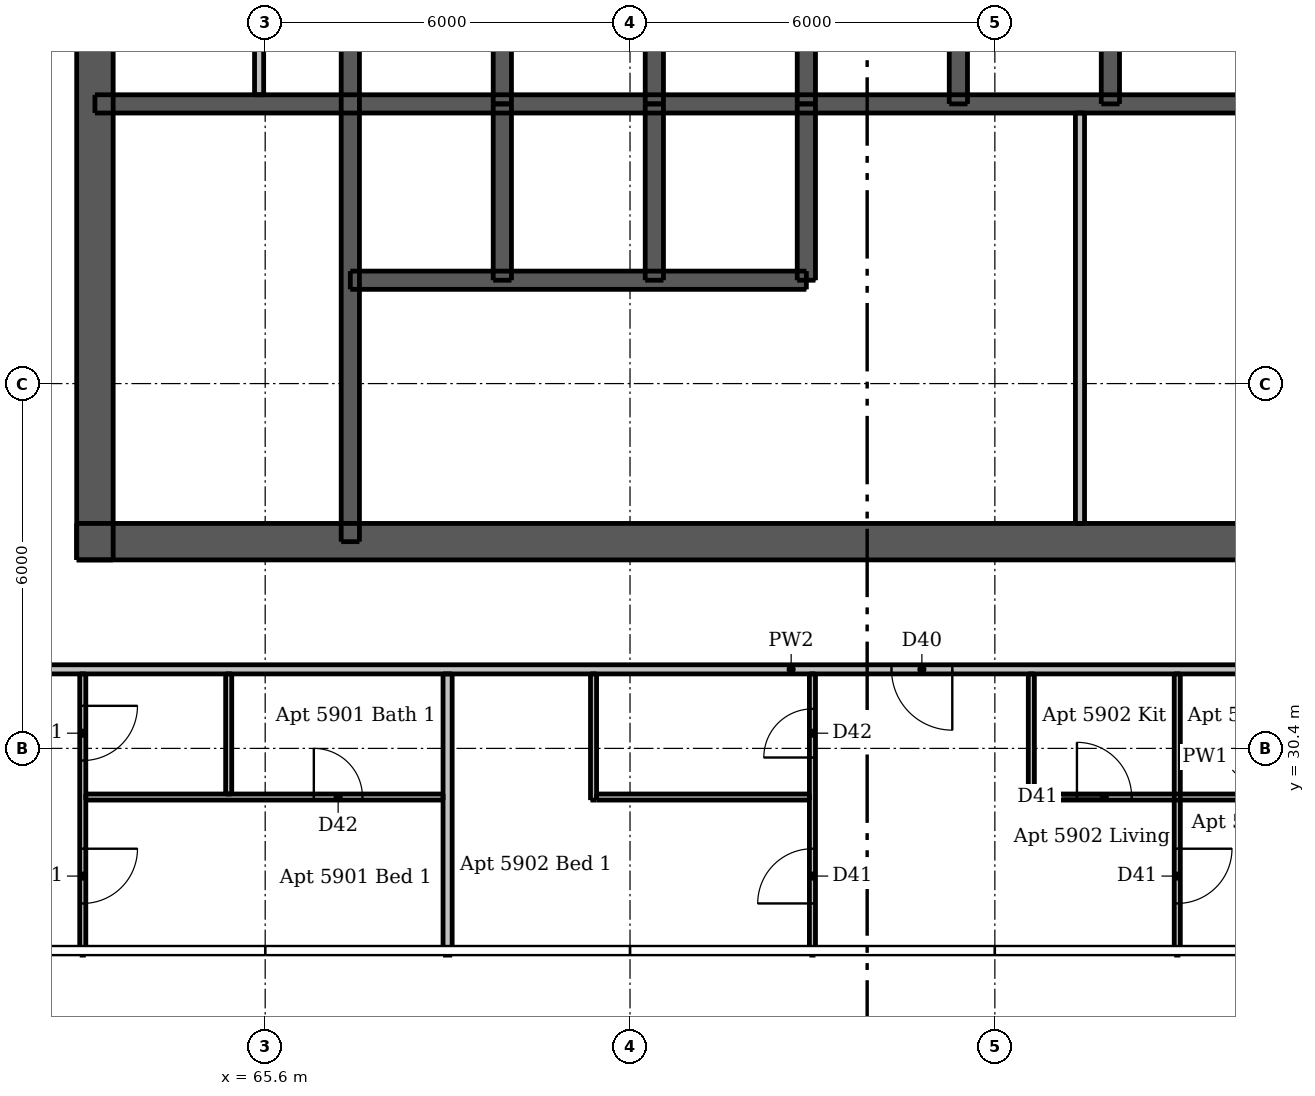
"""IFC4 building model, lengths in metres.
Left out: names, types, materials, properties, quantities, classifications, styles, units other than length and angle.
Written with IfcOpenShell. Run it as: python <this file> out.ifc"""

import sys

from ifc_helpers import new_model, si_unit, direction, frame, frame_2d, origin, place, context, subcontext, project, spatial, rectangle, extrude, element, fill, save


model = new_model("IFC4")
c1 = context("Model", 3, precision=1e-05, world=origin(), true_north=direction((0.0, 1.0)))
c2 = subcontext(c1, "Body", "Model", "MODEL_VIEW")
j1 = project(units=[si_unit("LENGTHUNIT", "METRE"), si_unit("PLANEANGLEUNIT", "RADIAN")], contexts=[c1])
p1 = place(None, origin())
s1 = spatial("IfcSite", under=j1, at=p1, CompositionType="ELEMENT")
p2 = place(p1, origin())
s2 = spatial("IfcBuilding", under=s1, at=p2, CompositionType="ELEMENT")
p3 = place(p2, frame((0.0, 0.0, 220.0)))
s3 = spatial("IfcBuildingStorey", under=s2, at=p3, CompositionType="ELEMENT", Elevation=220.0)
p4 = place(p3, frame((62.5, 33.8, 0.0), z_axis=(0.0, 0.0, 1.0), x_axis=(1.0, 0.0, 0.0)))
e1 = element("IfcWall", 1, at=p4, inside=s3, PredefinedType="SHEAR", context=c2, shape_type="SweptSolid", body=[
    extrude(rectangle(XDim=24.0, YDim=0.6, at=frame_2d((12.0, 0.0))), origin(), (0.0, 0.0, 1.0), 3.05),
])
p5 = place(p4, frame((1.925, 0.0, 0.0)))
e2 = element("IfcOpeningElement", 2, at=p5, cuts=e1, PredefinedType="OPENING", context=c2, shape_type="SweptSolid", body=[
    extrude(rectangle(XDim=1.1, YDim=2.1, at=frame_2d((0.55, 1.05))), frame((0.0, 0.31, 0.0), z_axis=(0.0, -1.0, 0.0), x_axis=(1.0, 0.0, 0.0)), (0.0, 0.0, 1.0), 0.62),
])
p6 = place(p4, frame((20.975, 0.0, 0.0)))
e3 = element("IfcOpeningElement", 3, at=p6, cuts=e1, PredefinedType="OPENING", context=c2, shape_type="SweptSolid", body=[
    extrude(rectangle(XDim=1.1, YDim=2.1, at=frame_2d((0.55, 1.05))), frame((0.0, 0.31, 0.0), z_axis=(0.0, -1.0, 0.0), x_axis=(1.0, 0.0, 0.0)), (0.0, 0.0, 1.0), 0.62),
])
p7 = place(p4, frame((8.0, 0.0, 0.0)))
e4 = element("IfcOpeningElement", 4, at=p7, cuts=e1, PredefinedType="OPENING", context=c2, shape_type="SweptSolid", body=[
    extrude(rectangle(XDim=1.1, YDim=2.1, at=frame_2d((0.55, 1.05))), frame((0.0, 0.31, 0.0), z_axis=(0.0, -1.0, 0.0), x_axis=(1.0, 0.0, 0.0)), (0.0, 0.0, 1.0), 0.62),
])
p8 = place(p4, frame((17.512, 0.0, 0.0)))
e5 = element("IfcOpeningElement", 5, at=p8, cuts=e1, PredefinedType="OPENING", context=c2, shape_type="SweptSolid", body=[
    extrude(rectangle(XDim=0.9, YDim=2.1, at=frame_2d((0.45, 1.05))), frame((0.0, 0.31, 0.0), z_axis=(0.0, -1.0, 0.0), x_axis=(1.0, 0.0, 0.0)), (0.0, 0.0, 1.0), 0.62),
])
p9 = place(p3, frame((62.8, 33.5, 0.0), z_axis=(0.0, 0.0, 1.0), x_axis=(0.0, 1.0, 0.0)))
e6 = element("IfcWall", 6, at=p9, inside=s3, PredefinedType="SHEAR", context=c2, shape_type="SweptSolid", body=[
    extrude(rectangle(XDim=24.0, YDim=0.6, at=frame_2d((12.0, 0.0))), origin(), (0.0, 0.0, 1.0), 3.05),
])
p10 = place(p9, frame((11.2, 0.0, 0.0)))
e7 = element("IfcOpeningElement", 7, at=p10, cuts=e6, PredefinedType="OPENING", context=c2, shape_type="SweptSolid", body=[
    extrude(rectangle(XDim=1.6, YDim=2.1, at=frame_2d((0.8, 1.05))), frame((0.0, 0.31, 0.0), z_axis=(0.0, -1.0, 0.0), x_axis=(1.0, 0.0, 0.0)), (0.0, 0.0, 1.0), 0.62),
])
p11 = place(p3, frame((62.8, 41.0, 0.0), z_axis=(0.0, 0.0, 1.0), x_axis=(1.0, 0.0, 0.0)))
e8 = element("IfcWall", 8, at=p11, inside=s3, PredefinedType="SHEAR", context=c2, shape_type="SweptSolid", body=[
    extrude(rectangle(XDim=23.4, YDim=0.3, at=frame_2d((11.7, 0.0))), origin(), (0.0, 0.0, 1.0), 3.05),
])
p12 = place(p3, frame((67.0, 33.8, 0.0), z_axis=(0.0, 0.0, 1.0), x_axis=(0.0, 1.0, 0.0)))
e9 = element("IfcWall", 9, at=p12, inside=s3, PredefinedType="SHEAR", context=c2, shape_type="SweptSolid", body=[
    extrude(rectangle(XDim=10.1, YDim=0.3, at=frame_2d((5.05, 0.0))), origin(), (0.0, 0.0, 1.0), 3.05),
])
p13 = place(p12, frame((0.5, 0.0, 0.0)))
e10 = element("IfcOpeningElement", 10, at=p13, cuts=e9, PredefinedType="OPENING", context=c2, shape_type="SweptSolid", body=[
    extrude(rectangle(XDim=1.1, YDim=2.1, at=frame_2d((0.55, 1.05))), frame((0.0, 0.16, 0.0), z_axis=(0.0, -1.0, 0.0), x_axis=(1.0, 0.0, 0.0)), (0.0, 0.0, 1.0), 0.32),
])
for number, where, z_axis, x_axis in (
    (11, (69.5, 41.0, 0.0), (0.0, 0.0, 1.0), (0.0, 1.0, 0.0)),
    (12, (72.0, 41.0, 0.0), (0.0, 0.0, 1.0), (0.0, 1.0, 0.0)),
    (13, (74.5, 41.0, 0.0), (0.0, 0.0, 1.0), (0.0, 1.0, 0.0)),
    (14, (77.0, 41.0, 0.0), (0.0, 0.0, 1.0), (0.0, 1.0, 0.0)),
    (15, (79.5, 41.0, 0.0), (0.0, 0.0, 1.0), (0.0, 1.0, 0.0)),
):
    element("IfcWall", number, at=place(p3, frame(where, z_axis=z_axis, x_axis=x_axis)), inside=s3, PredefinedType="SHEAR", context=c2, shape_type="SweptSolid", body=[
        extrude(rectangle(XDim=2.9, YDim=0.3, at=frame_2d((1.45, 0.0))), origin(), (0.0, 0.0, 1.0), 3.05),
    ])
p14 = place(p3, frame((67.0, 38.1, 0.0), z_axis=(0.0, 0.0, 1.0), x_axis=(1.0, 0.0, 0.0)))
e16 = element("IfcWall", 16, at=p14, inside=s3, PredefinedType="SHEAR", context=c2, shape_type="SweptSolid", body=[
    extrude(rectangle(XDim=7.5, YDim=0.3, at=frame_2d((3.75, 0.0))), origin(), (0.0, 0.0, 1.0), 3.05),
])
p15 = place(p14, frame((0.7, 0.0, 0.0)))
e17 = element("IfcOpeningElement", 17, at=p15, cuts=e16, PredefinedType="OPENING", context=c2, shape_type="SweptSolid", body=[
    extrude(rectangle(XDim=1.1, YDim=2.1, at=frame_2d((0.55, 1.05))), frame((0.0, 0.16, 0.0), z_axis=(0.0, -1.0, 0.0), x_axis=(1.0, 0.0, 0.0)), (0.0, 0.0, 1.0), 0.32),
])
p16 = place(p14, frame((3.2, 0.0, 0.0)))
e18 = element("IfcOpeningElement", 18, at=p16, cuts=e16, PredefinedType="OPENING", context=c2, shape_type="SweptSolid", body=[
    extrude(rectangle(XDim=1.1, YDim=2.1, at=frame_2d((0.55, 1.05))), frame((0.0, 0.16, 0.0), z_axis=(0.0, -1.0, 0.0), x_axis=(1.0, 0.0, 0.0)), (0.0, 0.0, 1.0), 0.32),
])
p17 = place(p14, frame((5.65, 0.0, 0.0)))
e19 = element("IfcOpeningElement", 19, at=p17, cuts=e16, PredefinedType="OPENING", context=c2, shape_type="SweptSolid", body=[
    extrude(rectangle(XDim=1.2, YDim=2.1, at=frame_2d((0.6, 1.05))), frame((0.0, 0.16, 0.0), z_axis=(0.0, -1.0, 0.0), x_axis=(1.0, 0.0, 0.0)), (0.0, 0.0, 1.0), 0.32),
])
for number, where, z_axis, x_axis in (
    (20, (69.5, 38.1, 0.0), (0.0, 0.0, 1.0), (0.0, 1.0, 0.0)),
    (21, (72.0, 38.1, 0.0), (0.0, 0.0, 1.0), (0.0, 1.0, 0.0)),
    (22, (74.5, 38.1, 0.0), (0.0, 0.0, 1.0), (0.0, 1.0, 0.0)),
):
    element("IfcWall", number, at=place(p3, frame(where, z_axis=z_axis, x_axis=x_axis)), inside=s3, PredefinedType="SHEAR", context=c2, shape_type="SweptSolid", body=[
        extrude(rectangle(XDim=2.9, YDim=0.3, at=frame_2d((1.45, 0.0))), origin(), (0.0, 0.0, 1.0), 3.05),
    ])
p18 = place(p3, frame((79.0, 34.1, 0.0), z_axis=(0.0, 0.0, 1.0), x_axis=(0.0, 1.0, 0.0)))
e23 = element("IfcWall", 23, at=p18, inside=s3, PredefinedType="PLUMBINGWALL", context=c2, shape_type="SweptSolid", body=[
    extrude(rectangle(XDim=6.75, YDim=0.15, at=frame_2d((3.375, 0.0))), origin(), (0.0, 0.0, 1.0), 3.05),
])
p19 = place(p3, frame((65.5, 41.15, 0.0), z_axis=(0.0, 0.0, 1.0), x_axis=(0.0, 1.0, 0.0)))
e24 = element("IfcWall", 24, at=p19, inside=s3, PredefinedType="PLUMBINGWALL", context=c2, shape_type="SweptSolid", body=[
    extrude(rectangle(XDim=2.6, YDim=0.15, at=frame_2d((1.3, 0.0))), origin(), (0.0, 0.0, 1.0), 3.05),
])
p20 = place(p3, frame((62.6, 31.625, 0.0), z_axis=(0.0, 0.0, 1.0), x_axis=(0.0, -1.0, 0.0)))
e25 = element("IfcWall", 25, at=p20, inside=s3, PredefinedType="PARTITIONING", context=c2, shape_type="SweptSolid", body=[
    extrude(rectangle(XDim=4.625, YDim=0.1, at=frame_2d((2.312, 0.0))), origin(), (0.0, 0.0, 1.0), 3.05),
])
p21 = place(p20, frame((0.525, 0.0, 0.0)))
e26 = element("IfcOpeningElement", 26, at=p21, cuts=e25, PredefinedType="OPENING", context=c2, shape_type="SweptSolid", body=[
    extrude(rectangle(XDim=0.9, YDim=2.1, at=frame_2d((0.45, 1.05))), frame((0.0, 0.06, 0.0), z_axis=(0.0, -1.0, 0.0), x_axis=(1.0, 0.0, 0.0)), (0.0, 0.0, 1.0), 0.12),
])
p22 = place(p20, frame((2.875, 0.0, 0.0)))
e27 = element("IfcOpeningElement", 27, at=p22, cuts=e25, PredefinedType="OPENING", context=c2, shape_type="SweptSolid", body=[
    extrude(rectangle(XDim=0.9, YDim=2.1, at=frame_2d((0.45, 1.05))), frame((0.0, 0.06, 0.0), z_axis=(0.0, -1.0, 0.0), x_axis=(1.0, 0.0, 0.0)), (0.0, 0.0, 1.0), 0.12),
])
p23 = place(p3, frame((65.0, 29.65, 0.0), z_axis=(0.0, 0.0, 1.0), x_axis=(0.0, 1.0, 0.0)))
e28 = element("IfcWall", 28, at=p23, inside=s3, PredefinedType="PARTITIONING", context=c2, shape_type="SweptSolid", body=[
    extrude(rectangle(XDim=1.975, YDim=0.1, at=frame_2d((0.988, 0.0))), origin(), (0.0, 0.0, 1.0), 3.05),
])
p24 = place(p3, frame((71.0, 29.55, 0.0), z_axis=(0.0, 0.0, 1.0), x_axis=(0.0, 1.0, 0.0)))
e29 = element("IfcWall", 29, at=p24, inside=s3, PredefinedType="PARTITIONING", context=c2, shape_type="SweptSolid", body=[
    extrude(rectangle(XDim=2.075, YDim=0.1, at=frame_2d((1.038, 0.0))), origin(), (0.0, 0.0, 1.0), 3.05),
])
p25 = place(p3, frame((74.6, 27.0, 0.0), z_axis=(0.0, 0.0, 1.0), x_axis=(0.0, 1.0, 0.0)))
e30 = element("IfcWall", 30, at=p25, inside=s3, PredefinedType="PARTITIONING", context=c2, shape_type="SweptSolid", body=[
    extrude(rectangle(XDim=4.625, YDim=0.1, at=frame_2d((2.312, 0.0))), origin(), (0.0, 0.0, 1.0), 3.05),
])
p26 = place(p25, frame((0.85, 0.0, 0.0)))
e31 = element("IfcOpeningElement", 31, at=p26, cuts=e30, PredefinedType="OPENING", context=c2, shape_type="SweptSolid", body=[
    extrude(rectangle(XDim=0.9, YDim=2.1, at=frame_2d((0.45, 1.05))), frame((0.0, 0.06, 0.0), z_axis=(0.0, -1.0, 0.0), x_axis=(1.0, 0.0, 0.0)), (0.0, 0.0, 1.0), 0.12),
])
p27 = place(p25, frame((3.25, 0.0, 0.0)))
e32 = element("IfcOpeningElement", 32, at=p27, cuts=e30, PredefinedType="OPENING", context=c2, shape_type="SweptSolid", body=[
    extrude(rectangle(XDim=0.8, YDim=2.1, at=frame_2d((0.4, 1.05))), frame((0.0, 0.06, 0.0), z_axis=(0.0, -1.0, 0.0), x_axis=(1.0, 0.0, 0.0)), (0.0, 0.0, 1.0), 0.12),
])
p28 = place(p3, frame((78.2, 29.55, 0.0), z_axis=(0.0, 0.0, 1.0), x_axis=(0.0, 1.0, 0.0)))
e33 = element("IfcWall", 33, at=p28, inside=s3, PredefinedType="PARTITIONING", context=c2, shape_type="SweptSolid", body=[
    extrude(rectangle(XDim=2.075, YDim=0.1, at=frame_2d((1.038, 0.0))), origin(), (0.0, 0.0, 1.0), 3.05),
])
p29 = place(p3, frame((80.6, 31.625, 0.0), z_axis=(0.0, 0.0, 1.0), x_axis=(0.0, -1.0, 0.0)))
e34 = element("IfcWall", 34, at=p29, inside=s3, PredefinedType="PARTITIONING", context=c2, shape_type="SweptSolid", body=[
    extrude(rectangle(XDim=4.625, YDim=0.1, at=frame_2d((2.312, 0.0))), origin(), (0.0, 0.0, 1.0), 3.05),
])
p30 = place(p29, frame((2.875, 0.0, 0.0)))
e35 = element("IfcOpeningElement", 35, at=p30, cuts=e34, PredefinedType="OPENING", context=c2, shape_type="SweptSolid", body=[
    extrude(rectangle(XDim=0.9, YDim=2.1, at=frame_2d((0.45, 1.05))), frame((0.0, 0.06, 0.0), z_axis=(0.0, -1.0, 0.0), x_axis=(1.0, 0.0, 0.0)), (0.0, 0.0, 1.0), 0.12),
])
p31 = place(p3, frame((62.65, 29.6, 0.0), z_axis=(0.0, 0.0, 1.0), x_axis=(1.0, 0.0, 0.0)))
e36 = element("IfcWall", 36, at=p31, inside=s3, PredefinedType="PARTITIONING", context=c2, shape_type="SweptSolid", body=[
    extrude(rectangle(XDim=5.875, YDim=0.1, at=frame_2d((2.938, 0.0))), origin(), (0.0, 0.0, 1.0), 3.05),
])
p32 = place(p31, frame((3.75, 0.0, 0.0)))
e37 = element("IfcOpeningElement", 37, at=p32, cuts=e36, PredefinedType="OPENING", context=c2, shape_type="SweptSolid", body=[
    extrude(rectangle(XDim=0.8, YDim=2.1, at=frame_2d((0.4, 1.05))), frame((0.0, 0.06, 0.0), z_axis=(0.0, -1.0, 0.0), x_axis=(1.0, 0.0, 0.0)), (0.0, 0.0, 1.0), 0.12),
])
p33 = place(p3, frame((71.05, 29.6, 0.0), z_axis=(0.0, 0.0, 1.0), x_axis=(1.0, 0.0, 0.0)))
e38 = element("IfcWall", 38, at=p33, inside=s3, PredefinedType="PARTITIONING", context=c2, shape_type="SweptSolid", body=[
    extrude(rectangle(XDim=3.5, YDim=0.1, at=frame_2d((1.75, 0.0))), origin(), (0.0, 0.0, 1.0), 3.05),
])
p34 = place(p3, frame((78.25, 29.6, 0.0), z_axis=(0.0, 0.0, 1.0), x_axis=(1.0, 0.0, 0.0)))
e39 = element("IfcWall", 39, at=p34, inside=s3, PredefinedType="PARTITIONING", context=c2, shape_type="SweptSolid", body=[
    extrude(rectangle(XDim=7.4, YDim=0.1, at=frame_2d((3.7, 0.0))), origin(), (0.0, 0.0, 1.0), 3.05),
])
p35 = place(p34, frame((0.7, 0.0, 0.0)))
e40 = element("IfcOpeningElement", 40, at=p35, cuts=e39, PredefinedType="OPENING", context=c2, shape_type="SweptSolid", body=[
    extrude(rectangle(XDim=0.9, YDim=2.1, at=frame_2d((0.45, 1.05))), frame((0.0, 0.06, 0.0), z_axis=(0.0, -1.0, 0.0), x_axis=(1.0, 0.0, 0.0)), (0.0, 0.0, 1.0), 0.12),
])
p36 = place(p34, frame((3.45, 0.0, 0.0)))
e41 = element("IfcOpeningElement", 41, at=p36, cuts=e39, PredefinedType="OPENING", context=c2, shape_type="SweptSolid", body=[
    extrude(rectangle(XDim=0.8, YDim=2.1, at=frame_2d((0.4, 1.05))), frame((0.0, 0.06, 0.0), z_axis=(0.0, -1.0, 0.0), x_axis=(1.0, 0.0, 0.0)), (0.0, 0.0, 1.0), 0.12),
])
p37 = place(p34, frame((5.95, 0.0, 0.0)))
e42 = element("IfcOpeningElement", 42, at=p37, cuts=e39, PredefinedType="OPENING", context=c2, shape_type="SweptSolid", body=[
    extrude(rectangle(XDim=0.9, YDim=2.1, at=frame_2d((0.45, 1.05))), frame((0.0, 0.06, 0.0), z_axis=(0.0, -1.0, 0.0), x_axis=(1.0, 0.0, 0.0)), (0.0, 0.0, 1.0), 0.12),
])
p38 = place(p3, frame((68.6, 27.0, 0.0), z_axis=(0.0, 0.0, 1.0), x_axis=(0.0, 1.0, 0.0)))
e43 = element("IfcWall", 43, at=p38, inside=s3, PredefinedType="PARTITIONING", context=c2, shape_type="SweptSolid", body=[
    extrude(rectangle(XDim=4.625, YDim=0.15, at=frame_2d((2.312, 0.0))), origin(), (0.0, 0.0, 1.0), 3.05),
])
p39 = place(p3, frame((89.525, 31.7, 0.0), z_axis=(0.0, 0.0, 1.0), x_axis=(-1.0, 0.0, 0.0)))
e44 = element("IfcWall", 44, at=p39, inside=s3, PredefinedType="PARTITIONING", context=c2, shape_type="SweptSolid", body=[
    extrude(rectangle(XDim=30.55, YDim=0.15, at=frame_2d((15.275, 0.0))), origin(), (0.0, 0.0, 1.0), 3.05),
])
p40 = place(p39, frame((28.275, 0.0, 0.0)))
e45 = element("IfcOpeningElement", 45, at=p40, cuts=e44, PredefinedType="OPENING", context=c2, shape_type="SweptSolid", body=[
    extrude(rectangle(XDim=1.0, YDim=2.1, at=frame_2d((0.5, 1.05))), frame((0.0, 0.085, 0.0), z_axis=(0.0, -1.0, 0.0), x_axis=(1.0, 0.0, 0.0)), (0.0, 0.0, 1.0), 0.17),
])
p41 = place(p39, frame((12.625, 0.0, 0.0)))
e46 = element("IfcOpeningElement", 46, at=p41, cuts=e44, PredefinedType="OPENING", context=c2, shape_type="SweptSolid", body=[
    extrude(rectangle(XDim=1.0, YDim=2.1, at=frame_2d((0.5, 1.05))), frame((0.0, 0.085, 0.0), z_axis=(0.0, -1.0, 0.0), x_axis=(1.0, 0.0, 0.0)), (0.0, 0.0, 1.0), 0.17),
])
p42 = place(p39, frame((2.425, 0.0, 0.0)))
e47 = element("IfcOpeningElement", 47, at=p42, cuts=e44, PredefinedType="OPENING", context=c2, shape_type="SweptSolid", body=[
    extrude(rectangle(XDim=1.0, YDim=2.1, at=frame_2d((0.5, 1.05))), frame((0.0, 0.085, 0.0), z_axis=(0.0, -1.0, 0.0), x_axis=(1.0, 0.0, 0.0)), (0.0, 0.0, 1.0), 0.17),
])
p43 = place(p5, origin())
e48 = element("IfcDoor", 48, at=p43, inside=s3, OperationType="SINGLE_SWING_LEFT", PredefinedType="DOOR", context=c2, shape_type="SweptSolid", body=[
    extrude(rectangle(XDim=1.1, YDim=2.1, at=frame_2d((0.55, 1.05))), frame((0.0, 0.288, 0.0), z_axis=(0.0, -1.0, 0.0), x_axis=(1.0, 0.0, 0.0)), (0.0, 0.0, 1.0), 0.05),
])
fill(e2, e48)
p44 = place(p7, origin())
e49 = element("IfcDoor", 49, at=p44, inside=s3, OperationType="SINGLE_SWING_LEFT", PredefinedType="DOOR", context=c2, shape_type="SweptSolid", body=[
    extrude(rectangle(XDim=1.1, YDim=2.1, at=frame_2d((0.55, 1.05))), frame((0.0, 0.288, 0.0), z_axis=(0.0, -1.0, 0.0), x_axis=(1.0, 0.0, 0.0)), (0.0, 0.0, 1.0), 0.05),
])
fill(e4, e49)
p45 = place(p13, origin())
e50 = element("IfcDoor", 50, at=p45, inside=s3, OperationType="SINGLE_SWING_RIGHT", PredefinedType="DOOR", context=c2, shape_type="SweptSolid", body=[
    extrude(rectangle(XDim=1.1, YDim=2.1, at=frame_2d((0.55, 1.05))), frame((0.0, -0.087, 0.0), z_axis=(0.0, -1.0, 0.0), x_axis=(1.0, 0.0, 0.0)), (0.0, 0.0, 1.0), 0.05),
])
fill(e10, e50)
p46 = place(p8, origin())
e51 = element("IfcDoor", 51, at=p46, inside=s3, OperationType="SINGLE_SWING_LEFT", PredefinedType="DOOR", context=c2, shape_type="SweptSolid", body=[
    extrude(rectangle(XDim=0.9, YDim=2.1, at=frame_2d((0.45, 1.05))), frame((0.0, 0.288, 0.0), z_axis=(0.0, -1.0, 0.0), x_axis=(1.0, 0.0, 0.0)), (0.0, 0.0, 1.0), 0.05),
])
fill(e5, e51)
p47 = place(p15, origin())
e52 = element("IfcDoor", 52, at=p47, inside=s3, OperationType="DOUBLE_DOOR_SLIDING", PredefinedType="DOOR", context=c2, shape_type="SweptSolid", body=[
    extrude(rectangle(XDim=1.1, YDim=2.1, at=frame_2d((0.55, 1.05))), frame((0.0, 0.025, 0.0), z_axis=(0.0, -1.0, 0.0), x_axis=(1.0, 0.0, 0.0)), (0.0, 0.0, 1.0), 0.05),
])
fill(e17, e52)
p48 = place(p16, origin())
e53 = element("IfcDoor", 53, at=p48, inside=s3, OperationType="DOUBLE_DOOR_SLIDING", PredefinedType="DOOR", context=c2, shape_type="SweptSolid", body=[
    extrude(rectangle(XDim=1.1, YDim=2.1, at=frame_2d((0.55, 1.05))), frame((0.0, 0.025, 0.0), z_axis=(0.0, -1.0, 0.0), x_axis=(1.0, 0.0, 0.0)), (0.0, 0.0, 1.0), 0.05),
])
fill(e18, e53)
p49 = place(p17, origin())
e54 = element("IfcDoor", 54, at=p49, inside=s3, OperationType="DOUBLE_DOOR_SLIDING", PredefinedType="DOOR", context=c2, shape_type="SweptSolid", body=[
    extrude(rectangle(XDim=1.2, YDim=2.1, at=frame_2d((0.6, 1.05))), frame((0.0, 0.025, 0.0), z_axis=(0.0, -1.0, 0.0), x_axis=(1.0, 0.0, 0.0)), (0.0, 0.0, 1.0), 0.05),
])
fill(e19, e54)
p50 = place(p21, origin())
e55 = element("IfcDoor", 55, at=p50, inside=s3, OperationType="SINGLE_SWING_LEFT", PredefinedType="DOOR", context=c2, shape_type="SweptSolid", body=[
    extrude(rectangle(XDim=0.9, YDim=2.1, at=frame_2d((0.45, 1.05))), frame((0.0, 0.025, 0.0), z_axis=(0.0, -1.0, 0.0), x_axis=(1.0, 0.0, 0.0)), (0.0, 0.0, 1.0), 0.05),
])
fill(e26, e55)
p51 = place(p22, origin())
e56 = element("IfcDoor", 56, at=p51, inside=s3, OperationType="SINGLE_SWING_LEFT", PredefinedType="DOOR", context=c2, shape_type="SweptSolid", body=[
    extrude(rectangle(XDim=0.9, YDim=2.1, at=frame_2d((0.45, 1.05))), frame((0.0, 0.025, 0.0), z_axis=(0.0, -1.0, 0.0), x_axis=(1.0, 0.0, 0.0)), (0.0, 0.0, 1.0), 0.05),
])
fill(e27, e56)
p52 = place(p32, origin())
e57 = element("IfcDoor", 57, at=p52, inside=s3, OperationType="SINGLE_SWING_LEFT", PredefinedType="DOOR", context=c2, shape_type="SweptSolid", body=[
    extrude(rectangle(XDim=0.8, YDim=2.1, at=frame_2d((0.4, 1.05))), frame((0.0, 0.025, 0.0), z_axis=(0.0, -1.0, 0.0), x_axis=(1.0, 0.0, 0.0)), (0.0, 0.0, 1.0), 0.05),
])
fill(e37, e57)
p53 = place(p41, origin())
e58 = element("IfcDoor", 58, at=p53, inside=s3, OperationType="SINGLE_SWING_LEFT", PredefinedType="DOOR", context=c2, shape_type="SweptSolid", body=[
    extrude(rectangle(XDim=1.0, YDim=2.1, at=frame_2d((0.5, 1.05))), frame((0.0, 0.025, 0.0), z_axis=(0.0, -1.0, 0.0), x_axis=(1.0, 0.0, 0.0)), (0.0, 0.0, 1.0), 0.05),
])
fill(e46, e58)
p54 = place(p35, origin())
e59 = element("IfcDoor", 59, at=p54, inside=s3, OperationType="SINGLE_SWING_LEFT", PredefinedType="DOOR", context=c2, shape_type="SweptSolid", body=[
    extrude(rectangle(XDim=0.9, YDim=2.1, at=frame_2d((0.45, 1.05))), frame((0.0, 0.025, 0.0), z_axis=(0.0, -1.0, 0.0), x_axis=(1.0, 0.0, 0.0)), (0.0, 0.0, 1.0), 0.05),
])
fill(e40, e59)
p55 = place(p26, origin())
e60 = element("IfcDoor", 60, at=p55, inside=s3, OperationType="SINGLE_SWING_LEFT", PredefinedType="DOOR", context=c2, shape_type="SweptSolid", body=[
    extrude(rectangle(XDim=0.9, YDim=2.1, at=frame_2d((0.45, 1.05))), frame((0.0, 0.025, 0.0), z_axis=(0.0, -1.0, 0.0), x_axis=(1.0, 0.0, 0.0)), (0.0, 0.0, 1.0), 0.05),
])
fill(e31, e60)
p56 = place(p27, origin())
e61 = element("IfcDoor", 61, at=p56, inside=s3, OperationType="SINGLE_SWING_LEFT", PredefinedType="DOOR", context=c2, shape_type="SweptSolid", body=[
    extrude(rectangle(XDim=0.8, YDim=2.1, at=frame_2d((0.4, 1.05))), frame((0.0, 0.025, 0.0), z_axis=(0.0, -1.0, 0.0), x_axis=(1.0, 0.0, 0.0)), (0.0, 0.0, 1.0), 0.05),
])
fill(e32, e61)
p57 = place(p30, origin())
e62 = element("IfcDoor", 62, at=p57, inside=s3, OperationType="SINGLE_SWING_LEFT", PredefinedType="DOOR", context=c2, shape_type="SweptSolid", body=[
    extrude(rectangle(XDim=0.9, YDim=2.1, at=frame_2d((0.45, 1.05))), frame((0.0, 0.025, 0.0), z_axis=(0.0, -1.0, 0.0), x_axis=(1.0, 0.0, 0.0)), (0.0, 0.0, 1.0), 0.05),
])
fill(e35, e62)
save(model, sys.argv[1])
